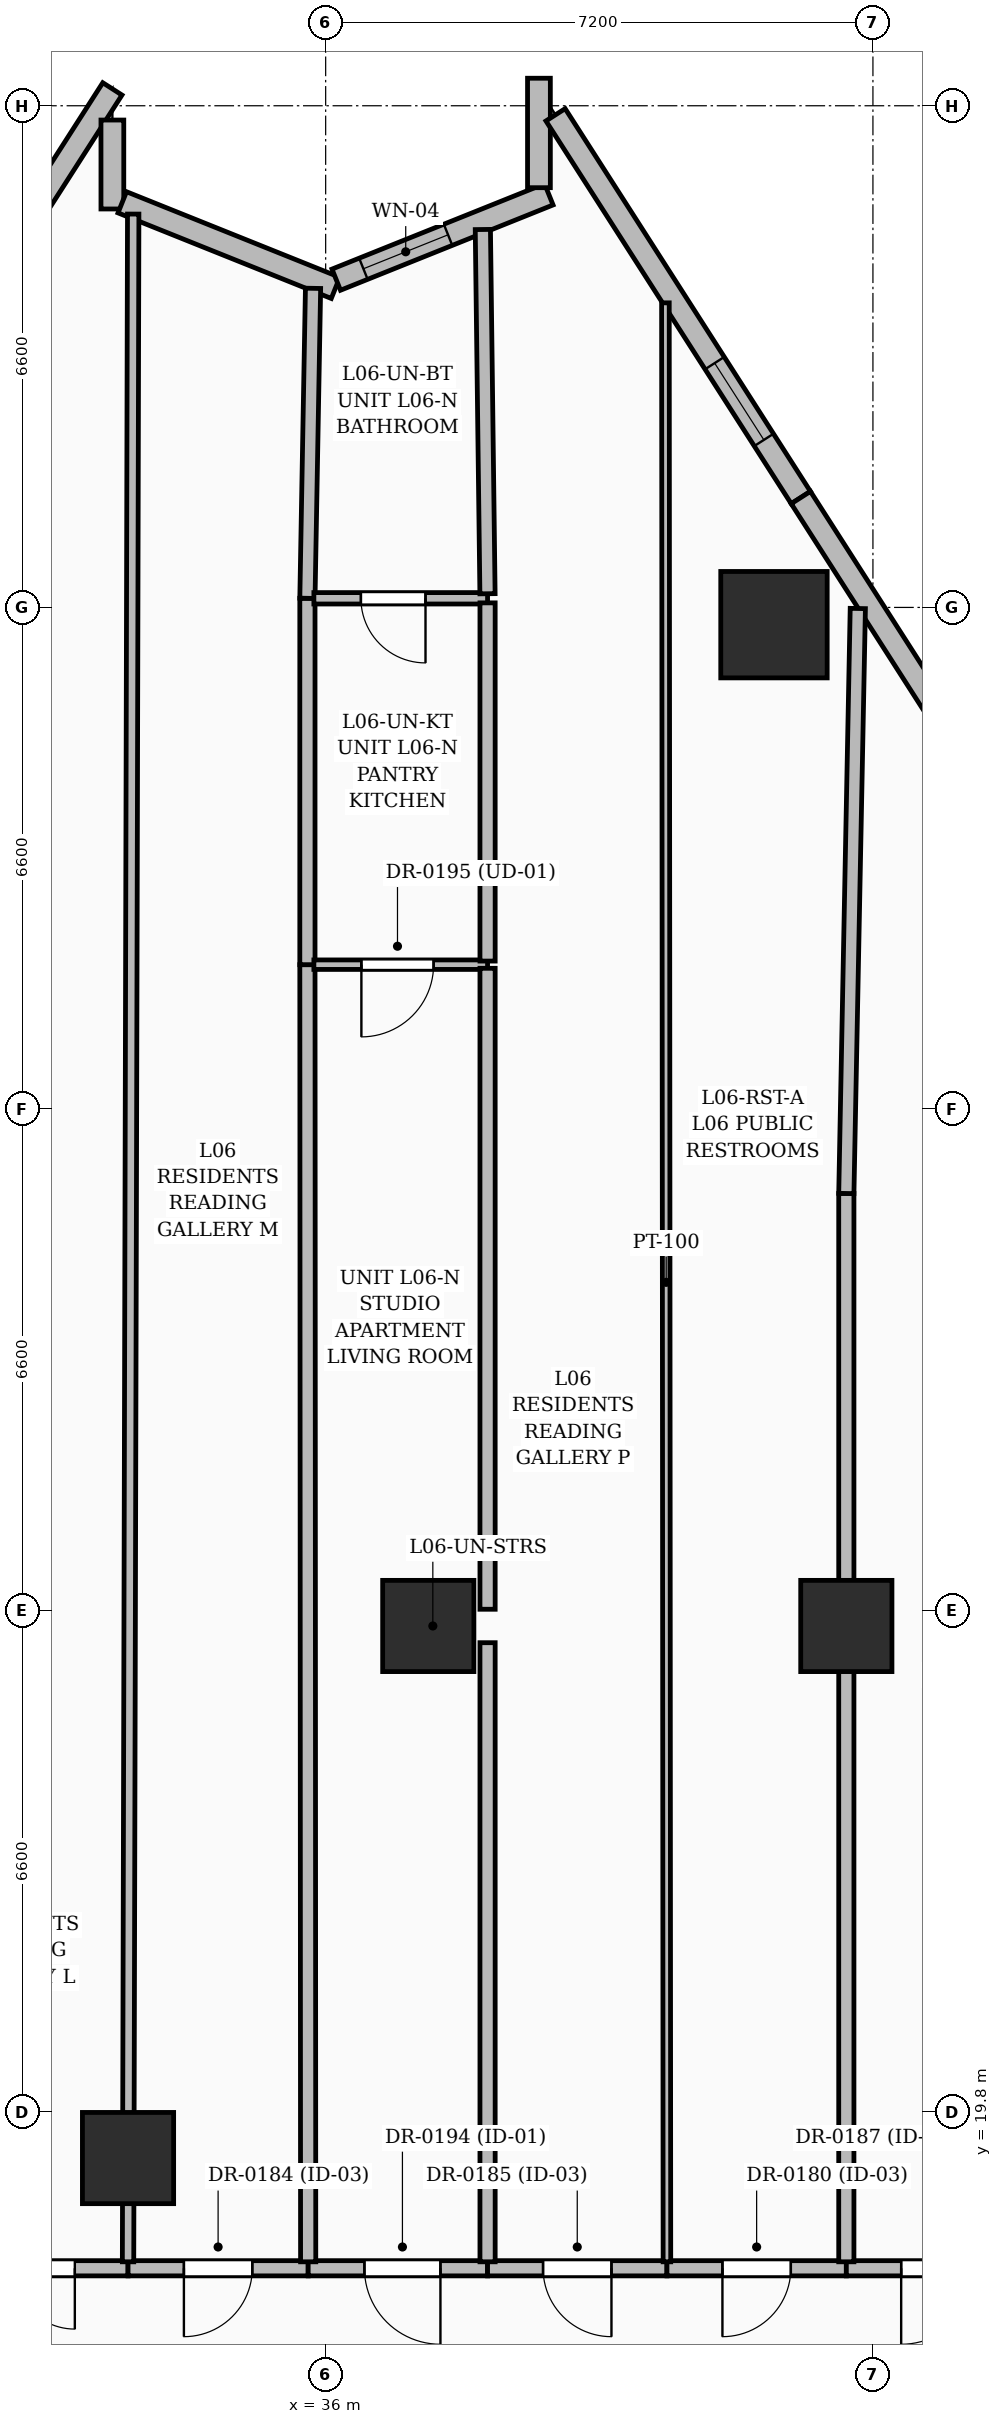
"""IFC4 building model, lengths in metres.
Left out: names, types, materials, properties, quantities, classifications, styles, units other than length and angle.
Written with IfcOpenShell. Run it as: python <this file> out.ifc"""

import sys

from ifc_helpers import new_model, si_unit, direction, frame, frame_2d, origin, origin_2d, place, context, subcontext, project, spatial, rectangle, extrude, element, fill, save


model = new_model("IFC4")
c1 = context("Model", 3, precision=1e-05, world=origin(), true_north=direction((0.0, 1.0)))
c2 = subcontext(c1, "Body", "Model", "MODEL_VIEW")
j1 = project(units=[si_unit("LENGTHUNIT", "METRE"), si_unit("PLANEANGLEUNIT", "RADIAN")], contexts=[c1])
p1 = place(None, origin())
s1 = spatial("IfcSite", under=j1, at=p1, CompositionType="ELEMENT")
p2 = place(p1, origin())
s2 = spatial("IfcBuilding", under=s1, at=p2, CompositionType="ELEMENT")
p3 = place(p2, frame((0.0, 0.0, 31.8)))
s3 = spatial("IfcBuildingStorey", under=s2, at=p3, CompositionType="ELEMENT", Elevation=31.8)
for number, where, z_axis, x_axis in (
    (1, (42.85, 26.2, 0.0), (0.0, 0.0, 1.0), (1.0, 0.0, 0.0)),
    (2, (37.35, 26.2, 0.0), (0.0, 0.0, 1.0), (1.0, 0.0, 0.0)),
    (3, (33.4, 19.2, 0.0), (0.0, 0.0, 1.0), (1.0, 0.0, 0.0)),
):
    element("IfcColumn", number, at=place(p3, frame(where, z_axis=z_axis, x_axis=x_axis)), inside=s3, PredefinedType="COLUMN", context=c2, shape_type="SweptSolid", body=[
        extrude(rectangle(XDim=1.2, YDim=1.2, at=origin_2d()), origin(), (0.0, 0.0, 1.0), 3.6),
    ])
p4 = place(p3, frame((41.898, 39.373, 0.0), z_axis=(0.0, 0.0, 1.0), x_axis=(1.0, 0.0, 0.0)))
e4 = element("IfcColumn", 4, at=p4, inside=s3, PredefinedType="COLUMN", context=c2, shape_type="SweptSolid", body=[
    extrude(rectangle(XDim=1.4, YDim=1.4, at=origin_2d()), origin(), (0.0, 0.0, 1.0), 3.6),
])
p5 = place(p3, frame((29.925, 41.321, 0.0), z_axis=(0.0, 0.0, 1.0), x_axis=(0.53953502124, 0.841963158847, 0.0)))
e5 = element("IfcWall", 5, at=p5, inside=s3, PredefinedType="SOLIDWALL", context=c2, shape_type="SweptSolid", body=[
    extrude(rectangle(XDim=6.059, YDim=0.3, at=frame_2d((3.029, 0.0))), origin(), (0.0, 0.0, 1.0), 3.35),
])
p6 = place(p5, frame((1.9, 0.0, 0.6)))
e6 = element("IfcOpeningElement", 6, at=p6, cuts=e5, PredefinedType="OPENING", context=c2, shape_type="SweptSolid", body=[
    extrude(rectangle(XDim=1.5, YDim=2.1, at=frame_2d((0.75, 1.05))), frame((0.0, 0.16, 0.0), z_axis=(0.0, -1.0, 0.0), x_axis=(1.0, 0.0, 0.0)), (0.0, 0.0, 1.0), 0.32),
])
p7 = place(p3, frame((33.194, 46.012, 0.0), z_axis=(0.0, 0.0, 1.0), x_axis=(0.0, -1.0, 0.0)))
e7 = element("IfcWall", 7, at=p7, inside=s3, PredefinedType="SOLIDWALL", context=c2, shape_type="SweptSolid", body=[
    extrude(rectangle(XDim=1.17, YDim=0.3, at=frame_2d((0.585, 0.0))), origin(), (0.0, 0.0, 1.0), 3.35),
])
p8 = place(p3, frame((33.324, 44.93, 0.0), z_axis=(0.0, 0.0, 1.0), x_axis=(0.928091921944, -0.372351157407, 0.0)))
e8 = element("IfcWall", 8, at=p8, inside=s3, PredefinedType="SOLIDWALL", context=c2, shape_type="SweptSolid", body=[
    extrude(rectangle(XDim=3.023, YDim=0.3, at=frame_2d((1.512, 0.0))), origin(), (0.0, 0.0, 1.0), 3.35),
])
p9 = place(p3, frame((36.139, 43.912, 0.0), z_axis=(0.0, 0.0, 1.0), x_axis=(0.928057043086, 0.372438081804, 0.0)))
e9 = element("IfcWall", 9, at=p9, inside=s3, PredefinedType="SOLIDWALL", context=c2, shape_type="SweptSolid", body=[
    extrude(rectangle(XDim=3.013, YDim=0.3, at=frame_2d((1.507, 0.0))), origin(), (0.0, 0.0, 1.0), 3.35),
])
p10 = place(p9, frame((0.385, 0.0, 0.8)))
e10 = element("IfcOpeningElement", 10, at=p10, cuts=e9, PredefinedType="OPENING", context=c2, shape_type="SweptSolid", body=[
    extrude(rectangle(XDim=1.2, YDim=1.8, at=frame_2d((0.6, 0.9))), frame((0.0, 0.16, 0.0), z_axis=(0.0, -1.0, 0.0), x_axis=(1.0, 0.0, 0.0)), (0.0, 0.0, 1.0), 0.32),
])
p11 = place(p3, frame((38.806, 45.122, 0.0), z_axis=(0.0, 0.0, 1.0), x_axis=(0.0, 1.0, 0.0)))
e11 = element("IfcWall", 11, at=p11, inside=s3, PredefinedType="SOLIDWALL", context=c2, shape_type="SweptSolid", body=[
    extrude(rectangle(XDim=1.44, YDim=0.3, at=frame_2d((0.72, 0.0))), origin(), (0.0, 0.0, 1.0), 3.35),
])
p12 = place(p3, frame((39.024, 46.081, 0.0), z_axis=(0.0, 0.0, 1.0), x_axis=(0.539527381639, -0.8419680543, 0.0)))
e12 = element("IfcWall", 12, at=p12, inside=s3, PredefinedType="SOLIDWALL", context=c2, shape_type="SweptSolid", body=[
    extrude(rectangle(XDim=5.981, YDim=0.3, at=frame_2d((2.99, 0.0))), origin(), (0.0, 0.0, 1.0), 3.35),
])
p13 = place(p12, frame((3.88, 0.0, 0.8)))
e13 = element("IfcOpeningElement", 13, at=p13, cuts=e12, PredefinedType="OPENING", context=c2, shape_type="SweptSolid", body=[
    extrude(rectangle(XDim=1.2, YDim=1.8, at=frame_2d((0.6, 0.9))), frame((0.0, 0.16, 0.0), z_axis=(0.0, -1.0, 0.0), x_axis=(1.0, 0.0, 0.0)), (0.0, 0.0, 1.0), 0.32),
])
p14 = place(p3, frame((42.251, 41.045, 0.0), z_axis=(0.0, 0.0, 1.0), x_axis=(0.539526045631, -0.841968910403, 0.0)))
e14 = element("IfcWall", 14, at=p14, inside=s3, PredefinedType="SOLIDWALL", context=c2, shape_type="SweptSolid", body=[
    extrude(rectangle(XDim=6.526, YDim=0.3, at=frame_2d((3.263, 0.0))), origin(), (0.0, 0.0, 1.0), 3.35),
])
p15 = place(p14, frame((3.275, 0.0, 0.6)))
e15 = element("IfcOpeningElement", 15, at=p15, cuts=e14, PredefinedType="OPENING", context=c2, shape_type="SweptSolid", body=[
    extrude(rectangle(XDim=1.5, YDim=2.1, at=frame_2d((0.75, 1.05))), frame((0.0, 0.16, 0.0), z_axis=(0.0, -1.0, 0.0), x_axis=(1.0, 0.0, 0.0)), (0.0, 0.0, 1.0), 0.32),
])
p16 = place(p3, frame((33.4, 17.75, 0.0), z_axis=(0.0, 0.0, 1.0), x_axis=(-1.0, 0.0, 0.0)))
e16 = element("IfcWall", 16, at=p16, inside=s3, PredefinedType="PARTITIONING", context=c2, shape_type="SweptSolid", body=[
    extrude(rectangle(XDim=3.0, YDim=0.2, at=frame_2d((1.5, 0.0))), origin(), (0.0, 0.0, 1.0), 3.35),
])
p17 = place(p16, frame((0.7, 0.0, 0.0)))
e17 = element("IfcOpeningElement", 17, at=p17, cuts=e16, PredefinedType="OPENING", context=c2, shape_type="SweptSolid", body=[
    extrude(rectangle(XDim=1.6, YDim=2.3, at=frame_2d((0.8, 1.15))), frame((0.0, 0.11, 0.0), z_axis=(0.0, -1.0, 0.0), x_axis=(1.0, 0.0, 0.0)), (0.0, 0.0, 1.0), 0.22),
])
p18 = place(p3, frame((35.77, 17.75, 0.0), z_axis=(0.0, 0.0, 1.0), x_axis=(-1.0, 0.0, 0.0)))
e18 = element("IfcWall", 18, at=p18, inside=s3, PredefinedType="PARTITIONING", context=c2, shape_type="SweptSolid", body=[
    extrude(rectangle(XDim=2.37, YDim=0.2, at=frame_2d((1.185, 0.0))), origin(), (0.0, 0.0, 1.0), 2.309),
])
p19 = place(p18, frame((0.735, 0.0, 0.0)))
e19 = element("IfcOpeningElement", 19, at=p19, cuts=e18, PredefinedType="OPENING", context=c2, shape_type="SweptSolid", body=[
    extrude(rectangle(XDim=0.9, YDim=2.1, at=frame_2d((0.45, 1.05))), frame((0.0, 0.11, 0.0), z_axis=(0.0, -1.0, 0.0), x_axis=(1.0, 0.0, 0.0)), (0.0, 0.0, 1.0), 0.22),
])
p20 = place(p3, frame((38.13, 17.75, 0.0), z_axis=(0.0, 0.0, 1.0), x_axis=(-1.0, 0.0, 0.0)))
e20 = element("IfcWall", 20, at=p20, inside=s3, PredefinedType="PARTITIONING", context=c2, shape_type="SweptSolid", body=[
    extrude(rectangle(XDim=2.36, YDim=0.2, at=frame_2d((1.18, 0.0))), origin(), (0.0, 0.0, 1.0), 3.35),
])
p21 = place(p20, frame((0.62, 0.0, 0.0)))
e21 = element("IfcOpeningElement", 21, at=p21, cuts=e20, PredefinedType="OPENING", context=c2, shape_type="SweptSolid", body=[
    extrude(rectangle(XDim=1.0, YDim=2.2, at=frame_2d((0.5, 1.1))), frame((0.0, 0.11, 0.0), z_axis=(0.0, -1.0, 0.0), x_axis=(1.0, 0.0, 0.0)), (0.0, 0.0, 1.0), 0.22),
])
p22 = place(p3, frame((40.49, 17.75, 0.0), z_axis=(0.0, 0.0, 1.0), x_axis=(-1.0, 0.0, 0.0)))
e22 = element("IfcWall", 22, at=p22, inside=s3, PredefinedType="PARTITIONING", context=c2, shape_type="SweptSolid", body=[
    extrude(rectangle(XDim=2.36, YDim=0.2, at=frame_2d((1.18, 0.0))), origin(), (0.0, 0.0, 1.0), 3.35),
])
p23 = place(p22, frame((0.73, 0.0, 0.0)))
e23 = element("IfcOpeningElement", 23, at=p23, cuts=e22, PredefinedType="OPENING", context=c2, shape_type="SweptSolid", body=[
    extrude(rectangle(XDim=0.9, YDim=2.1, at=frame_2d((0.45, 1.05))), frame((0.0, 0.11, 0.0), z_axis=(0.0, -1.0, 0.0), x_axis=(1.0, 0.0, 0.0)), (0.0, 0.0, 1.0), 0.22),
])
p24 = place(p3, frame((42.85, 17.75, 0.0), z_axis=(0.0, 0.0, 1.0), x_axis=(-1.0, 0.0, 0.0)))
e24 = element("IfcWall", 24, at=p24, inside=s3, PredefinedType="PARTITIONING", context=c2, shape_type="SweptSolid", body=[
    extrude(rectangle(XDim=2.36, YDim=0.2, at=frame_2d((1.18, 0.0))), origin(), (0.0, 0.0, 1.0), 3.35),
])
p25 = place(p24, frame((0.73, 0.0, 0.0)))
e25 = element("IfcOpeningElement", 25, at=p25, cuts=e24, PredefinedType="OPENING", context=c2, shape_type="SweptSolid", body=[
    extrude(rectangle(XDim=0.9, YDim=2.1, at=frame_2d((0.45, 1.05))), frame((0.0, 0.11, 0.0), z_axis=(0.0, -1.0, 0.0), x_axis=(1.0, 0.0, 0.0)), (0.0, 0.0, 1.0), 0.22),
])
p26 = place(p3, frame((47.27, 17.75, 0.0), z_axis=(0.0, 0.0, 1.0), x_axis=(-1.0, 0.0, 0.0)))
e26 = element("IfcWall", 26, at=p26, inside=s3, PredefinedType="PARTITIONING", context=c2, shape_type="SweptSolid", body=[
    extrude(rectangle(XDim=4.42, YDim=0.2, at=frame_2d((2.21, 0.0))), origin(), (0.0, 0.0, 1.0), 2.309),
])
p27 = place(p26, frame((2.698, 0.0, 0.0)))
e27 = element("IfcOpeningElement", 27, at=p27, cuts=e26, PredefinedType="OPENING", context=c2, shape_type="SweptSolid", body=[
    extrude(rectangle(XDim=1.0, YDim=2.2, at=frame_2d((0.5, 1.1))), frame((0.0, 0.11, 0.0), z_axis=(0.0, -1.0, 0.0), x_axis=(1.0, 0.0, 0.0)), (0.0, 0.0, 1.0), 0.22),
])
p28 = place(p3, frame((33.4, 17.835, 0.0), z_axis=(0.0, 0.0, 1.0), x_axis=(0.002519340237, 0.999996826457, 0.0)))
e28 = element("IfcWall", 28, at=p28, inside=s3, PredefinedType="PARTITIONING", context=c2, shape_type="SweptSolid", body=[
    extrude(rectangle(XDim=26.94, YDim=0.15, at=frame_2d((13.47, 0.0))), origin(), (0.0, 0.0, 1.0), 2.228),
])
p29 = place(p3, frame((35.77, 17.835, 0.0), z_axis=(0.0, 0.0, 1.0), x_axis=(-0.0005865689, 0.999999827968, 0.0)))
e29 = element("IfcWall", 29, at=p29, inside=s3, PredefinedType="PARTITIONING", context=c2, shape_type="SweptSolid", body=[
    extrude(rectangle(XDim=17.065, YDim=0.2, at=frame_2d((8.532, 0.0))), origin(), (0.0, 0.0, 1.0), 2.228),
])
p30 = place(p3, frame((35.76, 34.9, 0.0), z_axis=(0.0, 0.0, 1.0), x_axis=(0.0, 1.0, 0.0)))
e30 = element("IfcWall", 30, at=p30, inside=s3, PredefinedType="PARTITIONING", context=c2, shape_type="SweptSolid", body=[
    extrude(rectangle(XDim=4.82, YDim=0.2, at=frame_2d((2.41, 0.0))), origin(), (0.0, 0.0, 1.0), 2.37),
])
p31 = place(p3, frame((35.76, 39.72, 0.0), z_axis=(0.0, 0.0, 1.0), x_axis=(0.018136384294, 0.999835522256, 0.0)))
e31 = element("IfcWall", 31, at=p31, inside=s3, PredefinedType="PARTITIONING", context=c2, shape_type="SweptSolid", body=[
    extrude(rectangle(XDim=4.079, YDim=0.2, at=frame_2d((2.04, 0.0))), origin(), (0.0, 0.0, 1.0), 3.35),
])
p32 = place(p3, frame((38.13, 34.9, 0.0), z_axis=(0.0, 0.0, 1.0), x_axis=(-1.0, 0.0, 0.0)))
e32 = element("IfcWall", 32, at=p32, inside=s3, PredefinedType="PARTITIONING", context=c2, shape_type="SweptSolid", body=[
    extrude(rectangle(XDim=2.285, YDim=0.125, at=frame_2d((1.143, 0.0))), origin(), (0.0, 0.0, 1.0), 3.35),
])
p33 = place(p32, frame((0.71, 0.0, 0.0)))
e33 = element("IfcOpeningElement", 33, at=p33, cuts=e32, PredefinedType="OPENING", context=c2, shape_type="SweptSolid", body=[
    extrude(rectangle(XDim=0.95, YDim=2.2, at=frame_2d((0.475, 1.1))), frame((0.0, 0.072, 0.0), z_axis=(0.0, -1.0, 0.0), x_axis=(1.0, 0.0, 0.0)), (0.0, 0.0, 1.0), 0.145),
])
p34 = place(p3, frame((38.13, 17.835, 0.0), z_axis=(0.0, 0.0, 1.0), x_axis=(0.0, 1.0, 0.0)))
e34 = element("IfcWall", 34, at=p34, inside=s3, PredefinedType="PARTITIONING", context=c2, shape_type="SweptSolid", body=[
    extrude(rectangle(XDim=8.145, YDim=0.2, at=frame_2d((4.073, 0.0))), origin(), (0.0, 0.0, 1.0), 3.35),
])
p35 = place(p3, frame((38.13, 26.42, 0.0), z_axis=(0.0, 0.0, 1.0), x_axis=(0.0, 1.0, 0.0)))
e35 = element("IfcWall", 35, at=p35, inside=s3, PredefinedType="PARTITIONING", context=c2, shape_type="SweptSolid", body=[
    extrude(rectangle(XDim=8.433, YDim=0.2, at=frame_2d((4.216, 0.0))), origin(), (0.0, 0.0, 1.0), 2.709),
])
p36 = place(p3, frame((38.13, 39.72, 0.0), z_axis=(0.0, 0.0, 1.0), x_axis=(-1.0, 0.0, 0.0)))
e36 = element("IfcWall", 36, at=p36, inside=s3, PredefinedType="PARTITIONING", context=c2, shape_type="SweptSolid", body=[
    extrude(rectangle(XDim=2.285, YDim=0.15, at=frame_2d((1.143, 0.0))), origin(), (0.0, 0.0, 1.0), 2.37),
])
p37 = place(p36, frame((0.816, 0.0, 0.0)))
e37 = element("IfcOpeningElement", 37, at=p37, cuts=e36, PredefinedType="OPENING", context=c2, shape_type="SweptSolid", body=[
    extrude(rectangle(XDim=0.85, YDim=2.1, at=frame_2d((0.425, 1.05))), frame((0.0, 0.085, 0.0), z_axis=(0.0, -1.0, 0.0), x_axis=(1.0, 0.0, 0.0)), (0.0, 0.0, 1.0), 0.17),
])
p38 = place(p3, frame((38.13, 34.948, 0.0), z_axis=(0.0, 0.0, 1.0), x_axis=(0.0, 1.0, 0.0)))
e38 = element("IfcWall", 38, at=p38, inside=s3, PredefinedType="PARTITIONING", context=c2, shape_type="SweptSolid", body=[
    extrude(rectangle(XDim=4.712, YDim=0.2, at=frame_2d((2.356, 0.0))), origin(), (0.0, 0.0, 1.0), 2.37),
])
p39 = place(p3, frame((38.129, 39.78, 0.0), z_axis=(0.0, 0.0, 1.0), x_axis=(-0.01278680862, 0.999918245421, 0.0)))
e39 = element("IfcWall", 39, at=p39, inside=s3, PredefinedType="PARTITIONING", context=c2, shape_type="SweptSolid", body=[
    extrude(rectangle(XDim=4.792, YDim=0.2, at=frame_2d((2.396, 0.0))), origin(), (0.0, 0.0, 1.0), 3.35),
])
p40 = place(p3, frame((40.49, 17.835, 0.0), z_axis=(0.0, 0.0, 1.0), x_axis=(-0.000767321348, 0.999999705609, 0.0)))
e40 = element("IfcWall", 40, at=p40, inside=s3, PredefinedType="PARTITIONING", context=c2, shape_type="SweptSolid", body=[
    extrude(rectangle(XDim=25.772, YDim=0.1, at=frame_2d((12.886, 0.0))), origin(), (0.0, 0.0, 1.0), 2.309),
])
p41 = place(p3, frame((42.85, 17.835, 0.0), z_axis=(0.0, 0.0, 1.0), x_axis=(0.0, 1.0, 0.0)))
e41 = element("IfcWall", 41, at=p41, inside=s3, PredefinedType="PARTITIONING", context=c2, shape_type="SweptSolid", body=[
    extrude(rectangle(XDim=14.055, YDim=0.2, at=frame_2d((7.027, 0.0))), origin(), (0.0, 0.0, 1.0), 2.228),
])
p42 = place(p3, frame((42.85, 31.89, 0.0), z_axis=(0.0, 0.0, 1.0), x_axis=(0.019600966642, 0.999807882599, 0.0)))
e42 = element("IfcWall", 42, at=p42, inside=s3, PredefinedType="PARTITIONING", context=c2, shape_type="SweptSolid", body=[
    extrude(rectangle(XDim=7.698, YDim=0.2, at=frame_2d((3.849, 0.0))), origin(), (0.0, 0.0, 1.0), 2.37),
])
p43 = place(p10, origin())
e43 = element("IfcWindow", 43, at=p43, inside=s3, PartitioningType="SINGLE_PANEL", PredefinedType="WINDOW", context=c2, shape_type="SweptSolid", body=[
    extrude(rectangle(XDim=1.2, YDim=1.8, at=frame_2d((0.6, 0.9))), frame((0.0, 0.03, 0.0), z_axis=(0.0, -1.0, 0.0), x_axis=(1.0, 0.0, 0.0)), (0.0, 0.0, 1.0), 0.06),
])
fill(e10, e43)
p44 = place(p13, origin())
e44 = element("IfcWindow", 44, at=p44, inside=s3, PartitioningType="SINGLE_PANEL", PredefinedType="WINDOW", context=c2, shape_type="SweptSolid", body=[
    extrude(rectangle(XDim=1.2, YDim=1.8, at=frame_2d((0.6, 0.9))), frame((0.0, 0.03, 0.0), z_axis=(0.0, -1.0, 0.0), x_axis=(1.0, 0.0, 0.0)), (0.0, 0.0, 1.0), 0.06),
])
fill(e13, e44)
p45 = place(p25, origin())
e45 = element("IfcDoor", 45, at=p45, inside=s3, OperationType="SINGLE_SWING_RIGHT", PredefinedType="DOOR", context=c2, shape_type="SweptSolid", body=[
    extrude(rectangle(XDim=0.9, YDim=2.1, at=frame_2d((0.45, 1.05))), frame((0.0, 0.025, 0.0), z_axis=(0.0, -1.0, 0.0), x_axis=(1.0, 0.0, 0.0)), (0.0, 0.0, 1.0), 0.05),
])
fill(e25, e45)
p46 = place(p17, origin())
e46 = element("IfcDoor", 46, at=p46, inside=s3, OperationType="DOUBLE_DOOR_SINGLE_SWING", PredefinedType="DOOR", context=c2, shape_type="SweptSolid", body=[
    extrude(rectangle(XDim=1.6, YDim=2.3, at=frame_2d((0.8, 1.15))), frame((0.0, 0.025, 0.0), z_axis=(0.0, -1.0, 0.0), x_axis=(1.0, 0.0, 0.0)), (0.0, 0.0, 1.0), 0.05),
])
fill(e17, e46)
p47 = place(p19, origin())
e47 = element("IfcDoor", 47, at=p47, inside=s3, OperationType="SINGLE_SWING_RIGHT", PredefinedType="DOOR", context=c2, shape_type="SweptSolid", body=[
    extrude(rectangle(XDim=0.9, YDim=2.1, at=frame_2d((0.45, 1.05))), frame((0.0, 0.025, 0.0), z_axis=(0.0, -1.0, 0.0), x_axis=(1.0, 0.0, 0.0)), (0.0, 0.0, 1.0), 0.05),
])
fill(e19, e47)
p48 = place(p23, origin())
e48 = element("IfcDoor", 48, at=p48, inside=s3, OperationType="SINGLE_SWING_LEFT", PredefinedType="DOOR", context=c2, shape_type="SweptSolid", body=[
    extrude(rectangle(XDim=0.9, YDim=2.1, at=frame_2d((0.45, 1.05))), frame((0.0, 0.025, 0.0), z_axis=(0.0, -1.0, 0.0), x_axis=(1.0, 0.0, 0.0)), (0.0, 0.0, 1.0), 0.05),
])
fill(e23, e48)
p49 = place(p27, origin())
e49 = element("IfcDoor", 49, at=p49, inside=s3, OperationType="SINGLE_SWING_RIGHT", PredefinedType="DOOR", context=c2, shape_type="SweptSolid", body=[
    extrude(rectangle(XDim=1.0, YDim=2.2, at=frame_2d((0.5, 1.1))), frame((0.0, 0.025, 0.0), z_axis=(0.0, -1.0, 0.0), x_axis=(1.0, 0.0, 0.0)), (0.0, 0.0, 1.0), 0.05),
])
fill(e27, e49)
p50 = place(p21, origin())
e50 = element("IfcDoor", 50, at=p50, inside=s3, OperationType="SINGLE_SWING_LEFT", PredefinedType="DOOR", context=c2, shape_type="SweptSolid", body=[
    extrude(rectangle(XDim=1.0, YDim=2.2, at=frame_2d((0.5, 1.1))), frame((0.0, 0.025, 0.0), z_axis=(0.0, -1.0, 0.0), x_axis=(1.0, 0.0, 0.0)), (0.0, 0.0, 1.0), 0.05),
])
fill(e21, e50)
p51 = place(p33, origin())
e51 = element("IfcDoor", 51, at=p51, inside=s3, OperationType="SINGLE_SWING_RIGHT", PredefinedType="DOOR", context=c2, shape_type="SweptSolid", body=[
    extrude(rectangle(XDim=0.95, YDim=2.2, at=frame_2d((0.475, 1.1))), frame((0.0, 0.025, 0.0), z_axis=(0.0, -1.0, 0.0), x_axis=(1.0, 0.0, 0.0)), (0.0, 0.0, 1.0), 0.05),
])
fill(e33, e51)
p52 = place(p37, origin())
e52 = element("IfcDoor", 52, at=p52, inside=s3, OperationType="SINGLE_SWING_LEFT", PredefinedType="DOOR", context=c2, shape_type="SweptSolid", body=[
    extrude(rectangle(XDim=0.85, YDim=2.1, at=frame_2d((0.425, 1.05))), frame((0.0, 0.025, 0.0), z_axis=(0.0, -1.0, 0.0), x_axis=(1.0, 0.0, 0.0)), (0.0, 0.0, 1.0), 0.05),
])
fill(e37, e52)
save(model, sys.argv[1])
